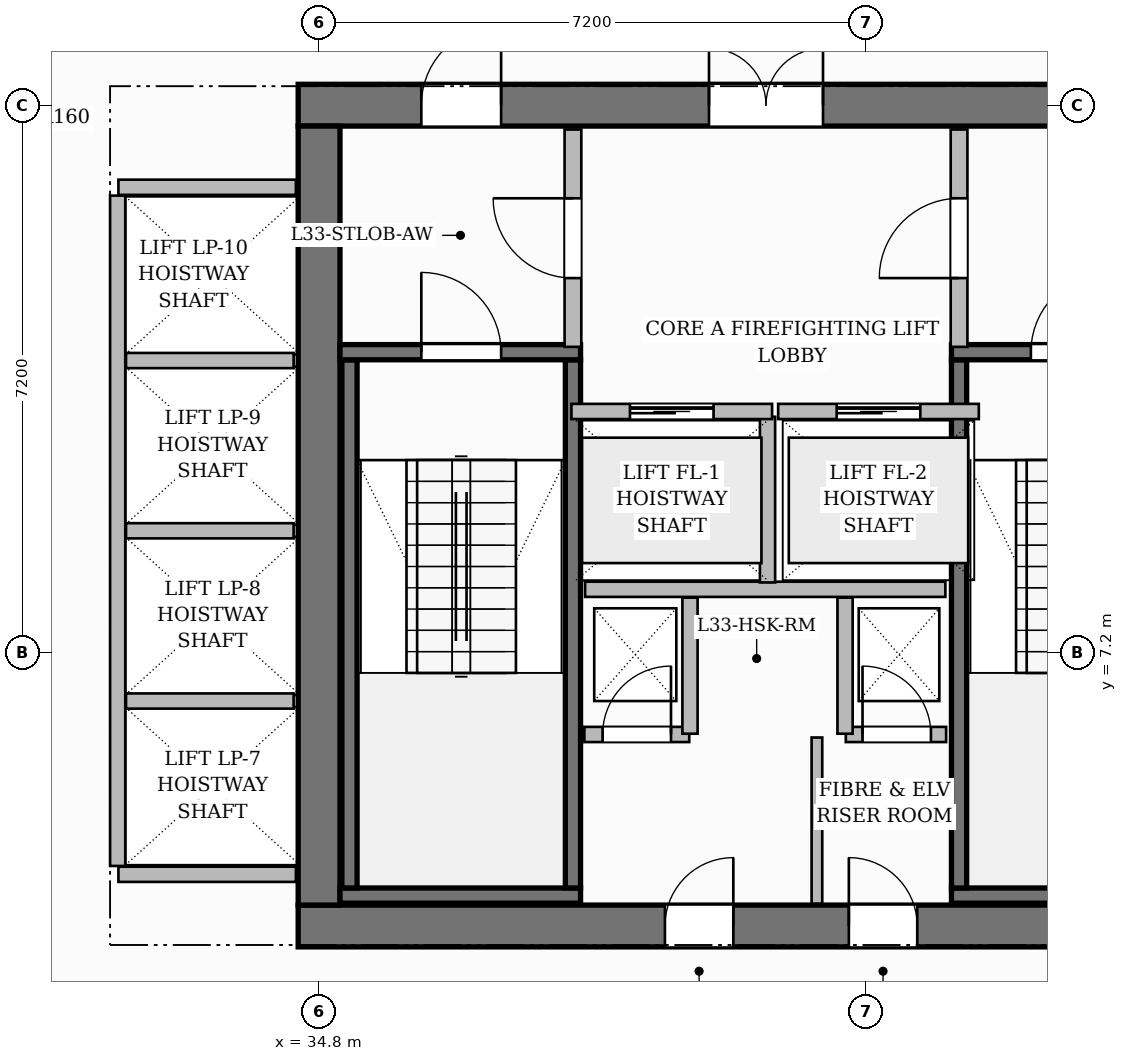
"""IFC4 building model, lengths in metres.
Left out: names, types, materials, properties, quantities, classifications, styles, units other than length and angle.
Written with IfcOpenShell. Run it as: python <this file> out.ifc"""

import sys

from ifc_helpers import new_model, si_unit, direction, frame, frame_2d, origin, place, context, subcontext, project, spatial, rectangle, extrude, source, transform, mapped, element, fill, save


model = new_model("IFC4")
c1 = context("Model", 3, precision=1e-05, world=origin(), true_north=direction((0.0, 1.0)))
c2 = subcontext(c1, "Body", "Model", "MODEL_VIEW")
j1 = project(units=[si_unit("LENGTHUNIT", "METRE"), si_unit("PLANEANGLEUNIT", "RADIAN")], contexts=[c1])
p1 = place(None, origin())
s1 = spatial("IfcSite", under=j1, at=p1, CompositionType="ELEMENT")
p2 = place(p1, origin())
s2 = spatial("IfcBuilding", under=s1, at=p2, CompositionType="ELEMENT")
p3 = place(p2, frame((0.0, 0.0, 134.0)))
s3 = spatial("IfcBuildingStorey", under=s2, at=p3, CompositionType="ELEMENT", Elevation=134.0)
p4 = place(p3, frame((34.525, 3.6, 0.0), z_axis=(0.0, 0.0, 1.0), x_axis=(1.0, 0.0, 0.0)))
e1 = element("IfcWall", 1, at=p4, inside=s3, PredefinedType="SHEAR", context=c2, shape_type="SweptSolid", body=[
    extrude(rectangle(XDim=15.55, YDim=0.55, at=frame_2d((7.775, 0.0))), origin(), (0.0, 0.0, 1.0), 3.7),
])
p5 = place(p4, frame((4.825, 0.0, 0.0)))
e2 = element("IfcOpeningElement", 2, at=p5, cuts=e1, PredefinedType="OPENING", context=c2, shape_type="SweptSolid", body=[
    extrude(rectangle(XDim=0.9, YDim=2.1, at=frame_2d((0.45, 1.05))), frame((0.0, 0.285, 0.0), z_axis=(0.0, -1.0, 0.0), x_axis=(1.0, 0.0, 0.0)), (0.0, 0.0, 1.0), 0.57),
])
p6 = place(p4, frame((7.245, 0.0, 0.0)))
e3 = element("IfcOpeningElement", 3, at=p6, cuts=e1, PredefinedType="OPENING", context=c2, shape_type="SweptSolid", body=[
    extrude(rectangle(XDim=0.9, YDim=2.1, at=frame_2d((0.45, 1.05))), frame((0.0, 0.285, 0.0), z_axis=(0.0, -1.0, 0.0), x_axis=(1.0, 0.0, 0.0)), (0.0, 0.0, 1.0), 0.57),
])
p7 = place(p3, frame((34.525, 14.4, 0.0), z_axis=(0.0, 0.0, 1.0), x_axis=(1.0, 0.0, 0.0)))
e4 = element("IfcWall", 4, at=p7, inside=s3, PredefinedType="SHEAR", context=c2, shape_type="SweptSolid", body=[
    extrude(rectangle(XDim=15.55, YDim=0.55, at=frame_2d((7.775, 0.0))), origin(), (0.0, 0.0, 1.0), 3.7),
])
p8 = place(p7, frame((5.405, 0.0, 0.0)))
e5 = element("IfcOpeningElement", 5, at=p8, cuts=e4, PredefinedType="OPENING", context=c2, shape_type="SweptSolid", body=[
    extrude(rectangle(XDim=1.5, YDim=2.2, at=frame_2d((0.75, 1.1))), frame((0.0, 0.285, 0.0), z_axis=(0.0, -1.0, 0.0), x_axis=(1.0, 0.0, 0.0)), (0.0, 0.0, 1.0), 0.57),
])
p9 = place(p7, frame((1.62, 0.0, 0.0)))
e6 = element("IfcOpeningElement", 6, at=p9, cuts=e4, PredefinedType="OPENING", context=c2, shape_type="SweptSolid", body=[
    extrude(rectangle(XDim=1.05, YDim=2.15, at=frame_2d((0.525, 1.075))), frame((0.0, 0.285, 0.0), z_axis=(0.0, -1.0, 0.0), x_axis=(1.0, 0.0, 0.0)), (0.0, 0.0, 1.0), 0.57),
])
p10 = place(p7, frame((11.25, 0.0, 0.0)))
e7 = element("IfcOpeningElement", 7, at=p10, cuts=e4, PredefinedType="OPENING", context=c2, shape_type="SweptSolid", body=[
    extrude(rectangle(XDim=1.05, YDim=2.15, at=frame_2d((0.525, 1.075))), frame((0.0, 0.285, 0.0), z_axis=(0.0, -1.0, 0.0), x_axis=(1.0, 0.0, 0.0)), (0.0, 0.0, 1.0), 0.57),
])
p11 = place(p3, frame((34.8, 3.875, 0.0), z_axis=(0.0, 0.0, 1.0), x_axis=(0.0, 1.0, 0.0)))
e8 = element("IfcWall", 8, at=p11, inside=s3, PredefinedType="SHEAR", context=c2, shape_type="SweptSolid", body=[
    extrude(rectangle(XDim=10.25, YDim=0.55, at=frame_2d((5.125, 0.0))), origin(), (0.0, 0.0, 1.0), 3.7),
])
p12 = place(p3, frame((35.075, 4.0, 0.0), z_axis=(0.0, 0.0, 1.0), x_axis=(1.0, 0.0, 0.0)))
e9 = element("IfcWall", 9, at=p12, inside=s3, PredefinedType="SHEAR", context=c2, shape_type="SweptSolid", body=[
    extrude(rectangle(XDim=3.165, YDim=0.2, at=frame_2d((1.583, 0.0))), origin(), (0.0, 0.0, 1.0), 3.7),
])
for number, where, z_axis, x_axis in (
    (10, (35.2, 4.1, 0.0), (0.0, 0.0, 1.0), (0.0, 1.0, 0.0)),
    (11, (38.14, 4.1, 0.0), (0.0, 0.0, 1.0), (0.0, 1.0, 0.0)),
):
    element("IfcWall", number, at=place(p3, frame(where, z_axis=z_axis, x_axis=x_axis)), inside=s3, PredefinedType="SHEAR", context=c2, shape_type="SweptSolid", body=[
        extrude(rectangle(XDim=6.95, YDim=0.2, at=frame_2d((3.475, 0.0))), origin(), (0.0, 0.0, 1.0), 3.7),
    ])
p13 = place(p3, frame((35.075, 11.15, 0.0), z_axis=(0.0, 0.0, 1.0), x_axis=(1.0, 0.0, 0.0)))
e12 = element("IfcWall", 12, at=p13, inside=s3, PredefinedType="SHEAR", context=c2, shape_type="SweptSolid", body=[
    extrude(rectangle(XDim=3.165, YDim=0.2, at=frame_2d((1.583, 0.0))), origin(), (0.0, 0.0, 1.0), 3.7),
])
p14 = place(p13, frame((1.07, 0.0, 0.0)))
e13 = element("IfcOpeningElement", 13, at=p14, cuts=e12, PredefinedType="OPENING", context=c2, shape_type="SweptSolid", body=[
    extrude(rectangle(XDim=1.05, YDim=2.2, at=frame_2d((0.525, 1.1))), frame((0.0, 0.11, 0.0), z_axis=(0.0, -1.0, 0.0), x_axis=(1.0, 0.0, 0.0)), (0.0, 0.0, 1.0), 0.22),
])
p15 = place(p3, frame((43.12, 4.0, 0.0), z_axis=(0.0, 0.0, 1.0), x_axis=(1.0, 0.0, 0.0)))
e14 = element("IfcWall", 14, at=p15, inside=s3, PredefinedType="SHEAR", context=c2, shape_type="SweptSolid", body=[
    extrude(rectangle(XDim=6.405, YDim=0.2, at=frame_2d((3.202, 0.0))), origin(), (0.0, 0.0, 1.0), 3.7),
])
p16 = place(p3, frame((43.22, 4.1, 0.0), z_axis=(0.0, 0.0, 1.0), x_axis=(0.0, 1.0, 0.0)))
e15 = element("IfcWall", 15, at=p16, inside=s3, PredefinedType="SHEAR", context=c2, shape_type="SweptSolid", body=[
    extrude(rectangle(XDim=6.95, YDim=0.2, at=frame_2d((3.475, 0.0))), origin(), (0.0, 0.0, 1.0), 3.7),
])
p17 = place(p3, frame((43.12, 11.15, 0.0), z_axis=(0.0, 0.0, 1.0), x_axis=(1.0, 0.0, 0.0)))
e16 = element("IfcWall", 16, at=p17, inside=s3, PredefinedType="SHEAR", context=c2, shape_type="SweptSolid", body=[
    extrude(rectangle(XDim=6.405, YDim=0.2, at=frame_2d((3.202, 0.0))), origin(), (0.0, 0.0, 1.0), 3.7),
])
p18 = place(p17, frame((1.045, 0.0, 0.0)))
e17 = element("IfcOpeningElement", 17, at=p18, cuts=e16, PredefinedType="OPENING", context=c2, shape_type="SweptSolid", body=[
    extrude(rectangle(XDim=1.05, YDim=2.2, at=frame_2d((0.525, 1.1))), frame((0.0, 0.11, 0.0), z_axis=(0.0, -1.0, 0.0), x_axis=(1.0, 0.0, 0.0)), (0.0, 0.0, 1.0), 0.22),
])
p19 = place(p17, frame((4.125, 0.0, 0.0)))
e18 = element("IfcOpeningElement", 18, at=p19, cuts=e16, PredefinedType="OPENING", context=c2, shape_type="SweptSolid", body=[
    extrude(rectangle(XDim=1.05, YDim=2.2, at=frame_2d((0.525, 1.1))), frame((0.0, 0.11, 0.0), z_axis=(0.0, -1.0, 0.0), x_axis=(1.0, 0.0, 0.0)), (0.0, 0.0, 1.0), 0.22),
])
p20 = place(p3, frame((38.3, 8.03, 0.0), z_axis=(0.0, 0.0, 1.0), x_axis=(1.0, 0.0, 0.0)))
e19 = element("IfcWall", 19, at=p20, inside=s3, PredefinedType="PARTITIONING", context=c2, shape_type="SweptSolid", body=[
    extrude(rectangle(XDim=4.74, YDim=0.2, at=frame_2d((2.37, 0.0))), origin(), (0.0, 0.0, 1.0), 3.45),
])
p21 = place(p3, frame((40.7, 8.12, 0.0), z_axis=(0.0, 0.0, 1.0), x_axis=(0.0, 1.0, 0.0)))
e20 = element("IfcWall", 20, at=p21, inside=s3, PredefinedType="PARTITIONING", context=c2, shape_type="SweptSolid", body=[
    extrude(rectangle(XDim=2.18, YDim=0.2, at=frame_2d((1.09, 0.0))), origin(), (0.0, 0.0, 1.0), 3.45),
])
p22 = place(p3, frame((38.14, 11.22, 0.0), z_axis=(0.0, 0.0, 1.0), x_axis=(0.0, 1.0, 0.0)))
e21 = element("IfcWall", 21, at=p22, inside=s3, PredefinedType="PARTITIONING", context=c2, shape_type="SweptSolid", body=[
    extrude(rectangle(XDim=2.86, YDim=0.22, at=frame_2d((1.43, 0.0))), origin(), (0.0, 0.0, 1.0), 3.45),
])
p23 = place(p22, frame((0.905, 0.0, 0.0)))
e22 = element("IfcOpeningElement", 22, at=p23, cuts=e21, PredefinedType="OPENING", context=c2, shape_type="SweptSolid", body=[
    extrude(rectangle(XDim=1.05, YDim=2.15, at=frame_2d((0.525, 1.075))), frame((0.0, 0.12, 0.0), z_axis=(0.0, -1.0, 0.0), x_axis=(1.0, 0.0, 0.0)), (0.0, 0.0, 1.0), 0.24),
])
p24 = place(p3, frame((43.22, 11.22, 0.0), z_axis=(0.0, 0.0, 1.0), x_axis=(0.0, 1.0, 0.0)))
e23 = element("IfcWall", 23, at=p24, inside=s3, PredefinedType="PARTITIONING", context=c2, shape_type="SweptSolid", body=[
    extrude(rectangle(XDim=2.86, YDim=0.22, at=frame_2d((1.43, 0.0))), origin(), (0.0, 0.0, 1.0), 3.45),
])
p25 = place(p24, frame((0.905, 0.0, 0.0)))
e24 = element("IfcOpeningElement", 24, at=p25, cuts=e23, PredefinedType="OPENING", context=c2, shape_type="SweptSolid", body=[
    extrude(rectangle(XDim=1.05, YDim=2.15, at=frame_2d((0.525, 1.075))), frame((0.0, 0.12, 0.0), z_axis=(0.0, -1.0, 0.0), x_axis=(1.0, 0.0, 0.0)), (0.0, 0.0, 1.0), 0.24),
])
p26 = place(p3, frame((38.29, 6.12, 0.0), z_axis=(0.0, 0.0, 1.0), x_axis=(1.0, 0.0, 0.0)))
e25 = element("IfcWall", 25, at=p26, inside=s3, PredefinedType="PARTITIONING", context=c2, shape_type="SweptSolid", body=[
    extrude(rectangle(XDim=1.38, YDim=0.2, at=frame_2d((0.69, 0.0))), origin(), (0.0, 0.0, 1.0), 3.45),
])
p27 = place(p26, frame((0.24, 0.0, 0.0)))
e26 = element("IfcOpeningElement", 26, at=p27, cuts=e25, PredefinedType="OPENING", context=c2, shape_type="SweptSolid", body=[
    extrude(rectangle(XDim=0.9, YDim=2.1, at=frame_2d((0.45, 1.05))), frame((0.0, 0.11, 0.0), z_axis=(0.0, -1.0, 0.0), x_axis=(1.0, 0.0, 0.0)), (0.0, 0.0, 1.0), 0.22),
])
p28 = place(p3, frame((39.68, 6.13, 0.0), z_axis=(0.0, 0.0, 1.0), x_axis=(0.0, 1.0, 0.0)))
e27 = element("IfcWall", 27, at=p28, inside=s3, PredefinedType="PARTITIONING", context=c2, shape_type="SweptSolid", body=[
    extrude(rectangle(XDim=1.79, YDim=0.2, at=frame_2d((0.895, 0.0))), origin(), (0.0, 0.0, 1.0), 3.45),
])
p29 = place(p3, frame((41.73, 6.12, 0.0), z_axis=(0.0, 0.0, 1.0), x_axis=(1.0, 0.0, 0.0)))
e28 = element("IfcWall", 28, at=p29, inside=s3, PredefinedType="PARTITIONING", context=c2, shape_type="SweptSolid", body=[
    extrude(rectangle(XDim=1.32, YDim=0.2, at=frame_2d((0.66, 0.0))), origin(), (0.0, 0.0, 1.0), 3.45),
])
p30 = place(p29, frame((0.22, 0.0, 0.0)))
e29 = element("IfcOpeningElement", 29, at=p30, cuts=e28, PredefinedType="OPENING", context=c2, shape_type="SweptSolid", body=[
    extrude(rectangle(XDim=0.9, YDim=2.1, at=frame_2d((0.45, 1.05))), frame((0.0, 0.11, 0.0), z_axis=(0.0, -1.0, 0.0), x_axis=(1.0, 0.0, 0.0)), (0.0, 0.0, 1.0), 0.22),
])
p31 = place(p3, frame((41.72, 6.13, 0.0), z_axis=(0.0, 0.0, 1.0), x_axis=(0.0, 1.0, 0.0)))
e30 = element("IfcWall", 30, at=p31, inside=s3, PredefinedType="PARTITIONING", context=c2, shape_type="SweptSolid", body=[
    extrude(rectangle(XDim=1.79, YDim=0.2, at=frame_2d((0.895, 0.0))), origin(), (0.0, 0.0, 1.0), 3.45),
])
p32 = place(p3, frame((41.35, 3.895, 0.0), z_axis=(0.0, 0.0, 1.0), x_axis=(0.0, 1.0, 0.0)))
e31 = element("IfcWall", 31, at=p32, inside=s3, PredefinedType="PARTITIONING", context=c2, shape_type="SweptSolid", body=[
    extrude(rectangle(XDim=2.185, YDim=0.14, at=frame_2d((1.093, 0.0))), origin(), (0.0, 0.0, 1.0), 3.45),
])
for number, where, z_axis, x_axis in (
    (32, (32.16, 4.28, 0.0), (0.0, 0.0, 1.0), (1.0, 0.0, 0.0)),
    (33, (32.16, 13.32, 0.0), (0.0, 0.0, 1.0), (1.0, 0.0, 0.0)),
):
    element("IfcWall", number, at=place(p3, frame(where, z_axis=z_axis, x_axis=x_axis)), inside=s3, PredefinedType="PARTITIONING", context=c2, shape_type="SweptSolid", body=[
        extrude(rectangle(XDim=2.335, YDim=0.2, at=frame_2d((1.167, 0.0))), origin(), (0.0, 0.0, 1.0), 3.45),
    ])
p33 = place(p3, frame((32.15, 4.39, 0.0), z_axis=(0.0, 0.0, 1.0), x_axis=(0.0, 1.0, 0.0)))
e34 = element("IfcWall", 34, at=p33, inside=s3, PredefinedType="PARTITIONING", context=c2, shape_type="SweptSolid", body=[
    extrude(rectangle(XDim=8.82, YDim=0.2, at=frame_2d((4.41, 0.0))), origin(), (0.0, 0.0, 1.0), 3.45),
])
for number, where, z_axis, x_axis in (
    (35, (32.26, 6.56, 0.0), (0.0, 0.0, 1.0), (1.0, 0.0, 0.0)),
    (36, (32.26, 8.8, 0.0), (0.0, 0.0, 1.0), (1.0, 0.0, 0.0)),
    (37, (32.26, 11.04, 0.0), (0.0, 0.0, 1.0), (1.0, 0.0, 0.0)),
):
    element("IfcWall", number, at=place(p3, frame(where, z_axis=z_axis, x_axis=x_axis)), inside=s3, PredefinedType="PARTITIONING", context=c2, shape_type="SweptSolid", body=[
        extrude(rectangle(XDim=2.205, YDim=0.2, at=frame_2d((1.103, 0.0))), origin(), (0.0, 0.0, 1.0), 3.45),
    ])
p34 = place(p3, frame((38.12, 10.37, 0.0), z_axis=(0.0, 0.0, 1.0), x_axis=(1.0, 0.0, 0.0)))
e38 = element("IfcWall", 38, at=p34, inside=s3, PredefinedType="PARTITIONING", context=c2, shape_type="SweptSolid", body=[
    extrude(rectangle(XDim=2.64, YDim=0.2, at=frame_2d((1.32, 0.0))), origin(), (0.0, 0.0, 1.0), 3.45),
])
p35 = place(p34, frame((0.77, 0.0, 0.0)))
e39 = element("IfcOpeningElement", 39, at=p35, cuts=e38, PredefinedType="OPENING", context=c2, shape_type="SweptSolid", body=[
    extrude(rectangle(XDim=1.1, YDim=2.2, at=frame_2d((0.55, 1.1))), frame((0.0, 0.11, 0.0), z_axis=(0.0, -1.0, 0.0), x_axis=(1.0, 0.0, 0.0)), (0.0, 0.0, 1.0), 0.22),
])
p36 = place(p3, frame((40.84, 10.37, 0.0), z_axis=(0.0, 0.0, 1.0), x_axis=(1.0, 0.0, 0.0)))
e40 = element("IfcWall", 40, at=p36, inside=s3, PredefinedType="PARTITIONING", context=c2, shape_type="SweptSolid", body=[
    extrude(rectangle(XDim=2.64, YDim=0.2, at=frame_2d((1.32, 0.0))), origin(), (0.0, 0.0, 1.0), 3.45),
])
p37 = place(p36, frame((0.77, 0.0, 0.0)))
e41 = element("IfcOpeningElement", 41, at=p37, cuts=e40, PredefinedType="OPENING", context=c2, shape_type="SweptSolid", body=[
    extrude(rectangle(XDim=1.1, YDim=2.2, at=frame_2d((0.55, 1.1))), frame((0.0, 0.11, 0.0), z_axis=(0.0, -1.0, 0.0), x_axis=(1.0, 0.0, 0.0)), (0.0, 0.0, 1.0), 0.22),
])
m1 = source(origin(), c2, "Body", "SweptSolid", [
    extrude(rectangle(XDim=1.05, YDim=2.2, at=frame_2d((0.525, 1.1))), frame((0.0, 0.025, 0.0), z_axis=(0.0, -1.0, 0.0), x_axis=(1.0, 0.0, 0.0)), (0.0, 0.0, 1.0), 0.05),
])
p38 = place(p14, origin())
e42 = element("IfcDoor", 42, at=p38, inside=s3, OperationType="SINGLE_SWING_LEFT", PredefinedType="DOOR", context=c2, shape_type="MappedRepresentation", body=[
    mapped(m1, transform((0.0, 0.0, 0.0), scale=1.0)),
])
fill(e13, e42)
p39 = place(p18, origin())
e43 = element("IfcDoor", 43, at=p39, inside=s3, OperationType="SINGLE_SWING_RIGHT", PredefinedType="DOOR", context=c2, shape_type="MappedRepresentation", body=[
    mapped(m1, transform((0.0, 0.0, 0.0), scale=1.0)),
])
fill(e17, e43)
m2 = source(origin(), c2, "Body", "SweptSolid", [
    extrude(rectangle(XDim=1.05, YDim=2.15, at=frame_2d((0.525, 1.075))), frame((0.0, 0.025, 0.0), z_axis=(0.0, -1.0, 0.0), x_axis=(1.0, 0.0, 0.0)), (0.0, 0.0, 1.0), 0.05),
])
p40 = place(p23, origin())
e44 = element("IfcDoor", 44, at=p40, inside=s3, OperationType="SINGLE_SWING_RIGHT", PredefinedType="DOOR", context=c2, shape_type="MappedRepresentation", body=[
    mapped(m2, transform((0.0, 0.0, 0.0), scale=1.0)),
])
fill(e22, e44)
p41 = place(p25, origin())
e45 = element("IfcDoor", 45, at=p41, inside=s3, OperationType="SINGLE_SWING_LEFT", PredefinedType="DOOR", context=c2, shape_type="MappedRepresentation", body=[
    mapped(m2, transform((0.0, 0.0, 0.0), scale=1.0)),
])
fill(e24, e45)
m3 = source(origin(), c2, "Body", "SweptSolid", [
    extrude(rectangle(XDim=1.5, YDim=2.2, at=frame_2d((0.75, 1.1))), frame((0.0, 0.025, 0.0), z_axis=(0.0, -1.0, 0.0), x_axis=(1.0, 0.0, 0.0)), (0.0, 0.0, 1.0), 0.05),
])
p42 = place(p8, origin())
e46 = element("IfcDoor", 46, at=p42, inside=s3, OperationType="DOUBLE_DOOR_SINGLE_SWING", PredefinedType="DOOR", context=c2, shape_type="MappedRepresentation", body=[
    mapped(m3, transform((0.0, 0.0, 0.0), scale=1.0)),
])
fill(e5, e46)
p43 = place(p9, origin())
e47 = element("IfcDoor", 47, at=p43, inside=s3, OperationType="SINGLE_SWING_RIGHT", PredefinedType="DOOR", context=c2, shape_type="MappedRepresentation", body=[
    mapped(m2, transform((0.0, 0.0, 0.0), scale=1.0)),
])
fill(e6, e47)
m4 = source(origin(), c2, "Body", "SweptSolid", [
    extrude(rectangle(XDim=0.9, YDim=2.1, at=frame_2d((0.45, 1.05))), frame((0.0, 0.025, 0.0), z_axis=(0.0, -1.0, 0.0), x_axis=(1.0, 0.0, 0.0)), (0.0, 0.0, 1.0), 0.05),
])
p44 = place(p27, origin())
e48 = element("IfcDoor", 48, at=p44, inside=s3, OperationType="SINGLE_SWING_RIGHT", PredefinedType="DOOR", context=c2, shape_type="MappedRepresentation", body=[
    mapped(m4, transform((0.0, 0.0, 0.0), scale=1.0)),
])
fill(e26, e48)
p45 = place(p30, origin())
e49 = element("IfcDoor", 49, at=p45, inside=s3, OperationType="SINGLE_SWING_LEFT", PredefinedType="DOOR", context=c2, shape_type="MappedRepresentation", body=[
    mapped(m4, transform((0.0, 0.0, 0.0), scale=1.0)),
])
fill(e29, e49)
p46 = place(p5, origin())
e50 = element("IfcDoor", 50, at=p46, inside=s3, OperationType="SINGLE_SWING_RIGHT", PredefinedType="DOOR", context=c2, shape_type="MappedRepresentation", body=[
    mapped(m4, transform((0.0, 0.0, 0.0), scale=1.0)),
])
fill(e2, e50)
p47 = place(p6, origin())
e51 = element("IfcDoor", 51, at=p47, inside=s3, OperationType="SINGLE_SWING_LEFT", PredefinedType="DOOR", context=c2, shape_type="MappedRepresentation", body=[
    mapped(m4, transform((0.0, 0.0, 0.0), scale=1.0)),
])
fill(e3, e51)
m5 = source(origin(), c2, "Body", "SweptSolid", [
    extrude(rectangle(XDim=1.1, YDim=2.2, at=frame_2d((0.55, 1.1))), frame((0.0, 0.025, 0.0), z_axis=(0.0, -1.0, 0.0), x_axis=(1.0, 0.0, 0.0)), (0.0, 0.0, 1.0), 0.05),
])
p48 = place(p35, origin())
e52 = element("IfcDoor", 52, at=p48, inside=s3, OperationType="SLIDING_TO_LEFT", PredefinedType="DOOR", context=c2, shape_type="MappedRepresentation", body=[
    mapped(m5, transform((0.0, 0.0, 0.0), scale=1.0)),
])
fill(e39, e52)
p49 = place(p37, origin())
e53 = element("IfcDoor", 53, at=p49, inside=s3, OperationType="SLIDING_TO_LEFT", PredefinedType="DOOR", context=c2, shape_type="MappedRepresentation", body=[
    mapped(m5, transform((0.0, 0.0, 0.0), scale=1.0)),
])
fill(e41, e53)
save(model, sys.argv[1])
